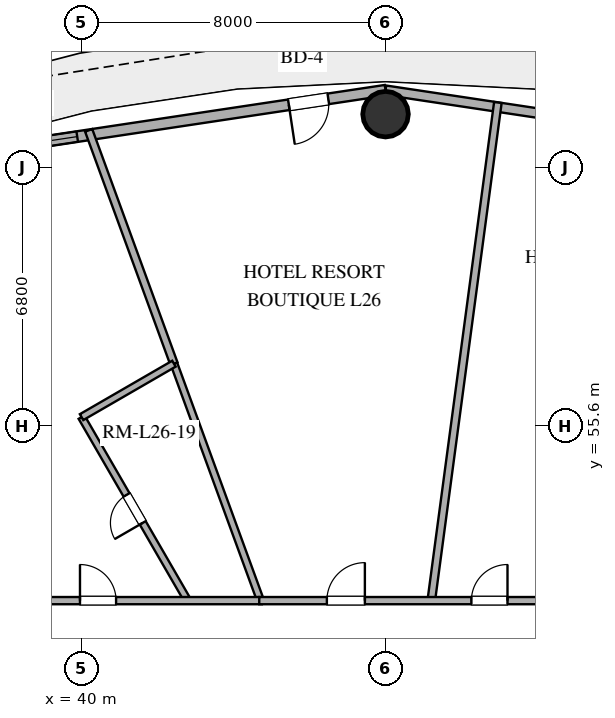
"""IFC4 building model, lengths in metres.
Left out: names, types, materials, properties, quantities, classifications, styles, units other than length and angle.
Written with IfcOpenShell. Run it as: python <this file> out.ifc"""

import sys

from ifc_helpers import new_model, si_unit, direction, frame, frame_2d, origin, origin_2d, place, context, subcontext, project, spatial, rectangle, hollow_circle, extrude, element, fill, save


model = new_model("IFC4")
c1 = context("Model", 3, precision=1e-05, world=origin(), true_north=direction((0.0, 1.0)))
c2 = subcontext(c1, "Body", "Model", "MODEL_VIEW")
j1 = project(units=[si_unit("LENGTHUNIT", "METRE"), si_unit("PLANEANGLEUNIT", "RADIAN")], contexts=[c1])
p1 = place(None, origin())
s1 = spatial("IfcSite", under=j1, at=p1, CompositionType="ELEMENT")
p2 = place(p1, origin())
s2 = spatial("IfcBuilding", under=s1, at=p2, CompositionType="ELEMENT")
p3 = place(p2, frame((0.0, 0.0, 105.6)))
s3 = spatial("IfcBuildingStorey", under=s2, at=p3, CompositionType="ELEMENT", Elevation=105.6)
p4 = place(p3, frame((48.0, 63.8, 0.0), z_axis=(0.0, 0.0, 1.0), x_axis=(1.0, 0.0, 0.0)))
e1 = element("IfcColumn", 1, at=p4, inside=s3, PredefinedType="COLUMN", context=c2, shape_type="SweptSolid", body=[
    extrude(hollow_circle(Radius=0.6, WallThickness=0.032, at=origin_2d()), origin(), (0.0, 0.0, 1.0), 3.38),
])
p5 = place(p3, frame((59.351, 62.723, 0.0), z_axis=(0.0, 0.0, 1.0), x_axis=(-0.988877774656, 0.148730450117, 0.0)))
e2 = element("IfcWall", 2, at=p5, inside=s3, PredefinedType="SOLIDWALL", context=c2, shape_type="SweptSolid", body=[
    extrude(rectangle(XDim=11.479, YDim=0.25, at=frame_2d((5.74, 0.0))), origin(), (0.0, 0.0, 1.0), 3.38),
])
p6 = place(p3, frame((48.0, 64.43, 0.0), z_axis=(0.0, 0.0, 1.0), x_axis=(-0.988877774656, -0.148730450117, 0.0)))
e3 = element("IfcWall", 3, at=p6, inside=s3, PredefinedType="SOLIDWALL", context=c2, shape_type="SweptSolid", body=[
    extrude(rectangle(XDim=11.479, YDim=0.28, at=frame_2d((5.74, 0.0))), origin(), (0.0, 0.0, 1.0), 3.38),
])
p7 = place(p6, frame((1.524, 0.0, 0.0)))
e4 = element("IfcOpeningElement", 4, at=p7, cuts=e3, PredefinedType="OPENING", context=c2, shape_type="SweptSolid", body=[
    extrude(rectangle(XDim=1.05, YDim=2.2, at=frame_2d((0.525, 1.1))), frame((0.0, 0.15, 0.0), z_axis=(0.0, -1.0, 0.0), x_axis=(1.0, 0.0, 0.0)), (0.0, 0.0, 1.0), 0.3),
])
p8 = place(p6, frame((8.205, 0.0, 0.85)))
e5 = element("IfcOpeningElement", 5, at=p8, cuts=e3, PredefinedType="OPENING", context=c2, shape_type="SweptSolid", body=[
    extrude(rectangle(XDim=1.65, YDim=2.0, at=frame_2d((0.825, 1.0))), frame((0.0, 0.15, 0.0), z_axis=(0.0, -1.0, 0.0), x_axis=(1.0, 0.0, 0.0)), (0.0, 0.0, 1.0), 0.3),
])
p9 = place(p3, frame((50.956, 64.107, 0.0), z_axis=(0.0, 0.0, 1.0), x_axis=(-0.132526518831, -0.99117945994, 0.0)))
e6 = element("IfcWall", 6, at=p9, inside=s3, PredefinedType="PARTITIONING", context=c2, shape_type="SweptSolid", body=[
    extrude(rectangle(XDim=13.223, YDim=0.2, at=frame_2d((6.612, 0.0))), origin(), (0.0, 0.0, 1.0), 2.74),
])
p10 = place(p3, frame((42.432, 57.234, 0.0), z_axis=(0.0, 0.0, 1.0), x_axis=(0.343307767445, -0.939222964376, 0.0)))
e7 = element("IfcWall", 7, at=p10, inside=s3, PredefinedType="PLUMBINGWALL", context=c2, shape_type="SweptSolid", body=[
    extrude(rectangle(XDim=6.638, YDim=0.18, at=frame_2d((3.319, 0.0))), origin(), (0.0, 0.0, 1.0), 2.74),
])
p11 = place(p3, frame((40.188, 63.374, 0.0), z_axis=(0.0, 0.0, 1.0), x_axis=(0.343281030887, -0.939232736777, 0.0)))
e8 = element("IfcWall", 8, at=p11, inside=s3, PredefinedType="PARTITIONING", context=c2, shape_type="SweptSolid", body=[
    extrude(rectangle(XDim=6.537, YDim=0.2, at=frame_2d((3.268, 0.0))), origin(), (0.0, 0.0, 1.0), 2.74),
])
p12 = place(p3, frame((42.794, 51.0, 0.0), z_axis=(0.0, 0.0, 1.0), x_axis=(-0.500713600684, 0.865613014049, 0.0)))
e9 = element("IfcWall", 9, at=p12, inside=s3, PredefinedType="PLUMBINGWALL", context=c2, shape_type="SweptSolid", body=[
    extrude(rectangle(XDim=5.578, YDim=0.18, at=frame_2d((2.789, 0.0))), origin(), (0.0, 0.0, 1.0), 2.74),
])
p13 = place(p12, frame((2.364, 0.0, 0.0)))
e10 = element("IfcOpeningElement", 10, at=p13, cuts=e9, PredefinedType="OPENING", context=c2, shape_type="SweptSolid", body=[
    extrude(rectangle(XDim=0.85, YDim=2.1, at=frame_2d((0.425, 1.05))), frame((0.0, 0.1, 0.0), z_axis=(0.0, -1.0, 0.0), x_axis=(1.0, 0.0, 0.0)), (0.0, 0.0, 1.0), 0.2),
])
p14 = place(p3, frame((34.8, 51.0, 0.0), z_axis=(0.0, 0.0, 1.0), x_axis=(1.0, 0.0, 0.0)))
e11 = element("IfcWall", 11, at=p14, inside=s3, PredefinedType="PARTITIONING", context=c2, shape_type="SweptSolid", body=[
    extrude(rectangle(XDim=9.945, YDim=0.19, at=frame_2d((4.972, 0.0))), origin(), (0.0, 0.0, 1.0), 2.74),
])
p15 = place(p14, frame((5.159, 0.0, 0.0)))
e12 = element("IfcOpeningElement", 12, at=p15, cuts=e11, PredefinedType="OPENING", context=c2, shape_type="SweptSolid", body=[
    extrude(rectangle(XDim=0.95, YDim=2.15, at=frame_2d((0.475, 1.075))), frame((0.0, 0.105, 0.0), z_axis=(0.0, -1.0, 0.0), x_axis=(1.0, 0.0, 0.0)), (0.0, 0.0, 1.0), 0.21),
])
p16 = place(p3, frame((44.677, 51.0, 0.0), z_axis=(0.0, 0.0, 1.0), x_axis=(1.0, 0.0, 0.0)))
e13 = element("IfcWall", 13, at=p16, inside=s3, PredefinedType="PARTITIONING", context=c2, shape_type="SweptSolid", body=[
    extrude(rectangle(XDim=7.621, YDim=0.19, at=frame_2d((3.81, 0.0))), origin(), (0.0, 0.0, 1.0), 2.74),
])
p17 = place(p16, frame((1.78, 0.0, 0.0)))
e14 = element("IfcOpeningElement", 14, at=p17, cuts=e13, PredefinedType="OPENING", context=c2, shape_type="SweptSolid", body=[
    extrude(rectangle(XDim=1.0, YDim=2.2, at=frame_2d((0.5, 1.1))), frame((0.0, 0.105, 0.0), z_axis=(0.0, -1.0, 0.0), x_axis=(1.0, 0.0, 0.0)), (0.0, 0.0, 1.0), 0.21),
])
p18 = place(p16, frame((5.583, 0.0, 0.0)))
e15 = element("IfcOpeningElement", 15, at=p18, cuts=e13, PredefinedType="OPENING", context=c2, shape_type="SweptSolid", body=[
    extrude(rectangle(XDim=0.95, YDim=2.15, at=frame_2d((0.475, 1.075))), frame((0.0, 0.105, 0.0), z_axis=(0.0, -1.0, 0.0), x_axis=(1.0, 0.0, 0.0)), (0.0, 0.0, 1.0), 0.21),
])
p19 = place(p3, frame((40.001, 55.828, 0.0), z_axis=(0.0, 0.0, 1.0), x_axis=(0.865614723212, 0.50071064594, 0.0)))
e16 = element("IfcWall", 16, at=p19, inside=s3, PredefinedType="PLUMBINGWALL", context=c2, shape_type="SweptSolid", body=[
    extrude(rectangle(XDim=2.808, YDim=0.18, at=frame_2d((1.404, 0.0))), origin(), (0.0, 0.0, 1.0), 2.74),
])
p20 = place(p7, origin())
e17 = element("IfcDoor", 17, at=p20, inside=s3, OperationType="SINGLE_SWING_RIGHT", PredefinedType="DOOR", context=c2, shape_type="SweptSolid", body=[
    extrude(rectangle(XDim=1.05, YDim=2.2, at=frame_2d((0.525, 1.1))), frame((0.0, 0.025, 0.0), z_axis=(0.0, -1.0, 0.0), x_axis=(1.0, 0.0, 0.0)), (0.0, 0.0, 1.0), 0.05),
])
fill(e4, e17)
p21 = place(p8, origin())
e18 = element("IfcWindow", 18, at=p21, inside=s3, PartitioningType="SINGLE_PANEL", PredefinedType="WINDOW", context=c2, shape_type="SweptSolid", body=[
    extrude(rectangle(XDim=1.65, YDim=2.0, at=frame_2d((0.825, 1.0))), frame((0.0, 0.03, 0.0), z_axis=(0.0, -1.0, 0.0), x_axis=(1.0, 0.0, 0.0)), (0.0, 0.0, 1.0), 0.06),
])
fill(e5, e18)
p22 = place(p13, origin())
e19 = element("IfcDoor", 19, at=p22, inside=s3, OperationType="SINGLE_SWING_LEFT", PredefinedType="DOOR", context=c2, shape_type="SweptSolid", body=[
    extrude(rectangle(XDim=0.85, YDim=2.1, at=frame_2d((0.425, 1.05))), frame((0.0, 0.025, 0.0), z_axis=(0.0, -1.0, 0.0), x_axis=(1.0, 0.0, 0.0)), (0.0, 0.0, 1.0), 0.05),
])
fill(e10, e19)
p23 = place(p15, origin())
e20 = element("IfcDoor", 20, at=p23, inside=s3, OperationType="SINGLE_SWING_LEFT", PredefinedType="DOOR", context=c2, shape_type="SweptSolid", body=[
    extrude(rectangle(XDim=0.95, YDim=2.15, at=frame_2d((0.475, 1.075))), frame((0.0, 0.025, 0.0), z_axis=(0.0, -1.0, 0.0), x_axis=(1.0, 0.0, 0.0)), (0.0, 0.0, 1.0), 0.05),
])
fill(e12, e20)
p24 = place(p17, origin())
e21 = element("IfcDoor", 21, at=p24, inside=s3, OperationType="SINGLE_SWING_RIGHT", PredefinedType="DOOR", context=c2, shape_type="SweptSolid", body=[
    extrude(rectangle(XDim=1.0, YDim=2.2, at=frame_2d((0.5, 1.1))), frame((0.0, 0.025, 0.0), z_axis=(0.0, -1.0, 0.0), x_axis=(1.0, 0.0, 0.0)), (0.0, 0.0, 1.0), 0.05),
])
fill(e14, e21)
p25 = place(p18, origin())
e22 = element("IfcDoor", 22, at=p25, inside=s3, OperationType="SINGLE_SWING_RIGHT", PredefinedType="DOOR", context=c2, shape_type="SweptSolid", body=[
    extrude(rectangle(XDim=0.95, YDim=2.15, at=frame_2d((0.475, 1.075))), frame((0.0, 0.025, 0.0), z_axis=(0.0, -1.0, 0.0), x_axis=(1.0, 0.0, 0.0)), (0.0, 0.0, 1.0), 0.05),
])
fill(e15, e22)
save(model, sys.argv[1])
